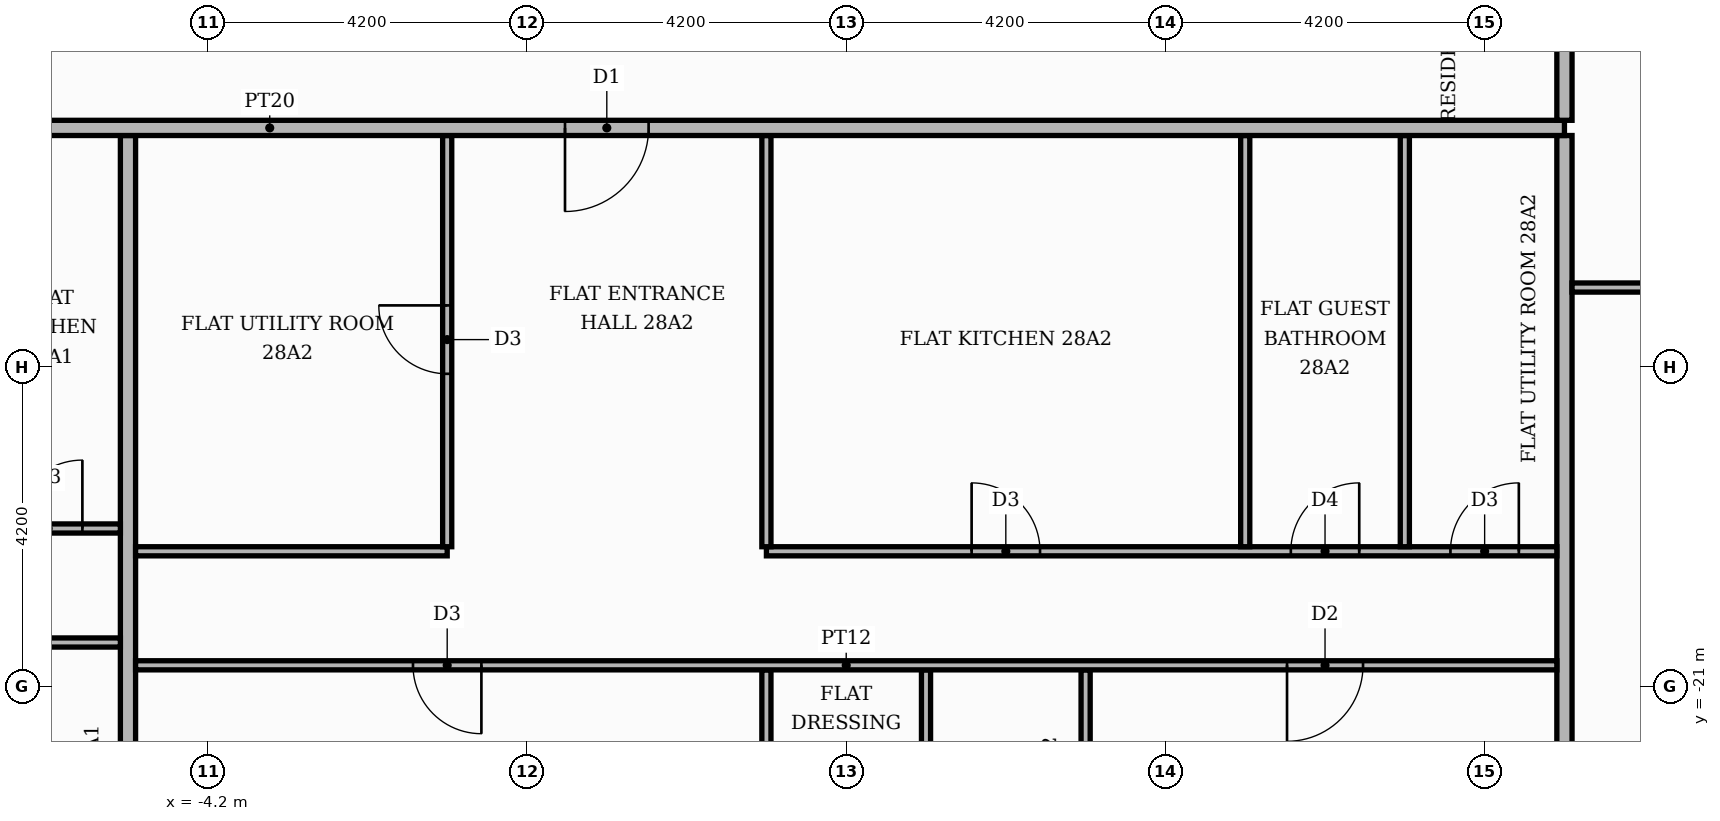
"""IFC4 building model, lengths in metres.
Left out: names, types, materials, properties, quantities, classifications, styles, units other than length and angle.
Written with IfcOpenShell. Run it as: python <this file> out.ifc"""

import sys

from ifc_helpers import new_model, si_unit, direction, frame, frame_2d, origin, place, context, subcontext, project, spatial, rectangle, extrude, element, fill, save


model = new_model("IFC4")
c1 = context("Model", 3, precision=1e-05, world=origin(), true_north=direction((0.0, 1.0)))
c2 = subcontext(c1, "Body", "Model", "MODEL_VIEW")
j1 = project(units=[si_unit("LENGTHUNIT", "METRE"), si_unit("PLANEANGLEUNIT", "RADIAN")], contexts=[c1])
p1 = place(None, origin())
s1 = spatial("IfcSite", under=j1, at=p1, CompositionType="ELEMENT")
p2 = place(p1, origin())
s2 = spatial("IfcBuilding", under=s1, at=p2, CompositionType="ELEMENT")
p3 = place(p2, frame((0.0, 0.0, 118.2)))
s3 = spatial("IfcBuildingStorey", under=s2, at=p3, CompositionType="ELEMENT", Elevation=118.2)
p4 = place(p3, frame((-5.25, -25.42, 0.0), z_axis=(0.0, 0.0, 1.0), x_axis=(0.0, 1.0, 0.0)))
e1 = element("IfcWall", 1, at=p4, inside=s3, PredefinedType="PARTITIONING", context=c2, shape_type="SweptSolid", body=[
    extrude(rectangle(XDim=11.67, YDim=0.2, at=frame_2d((5.835, 0.0))), origin(), (0.0, 0.0, 1.0), 3.48),
])
p5 = place(p3, frame((3.15, -25.42, 0.0), z_axis=(0.0, 0.0, 1.0), x_axis=(0.0, 1.0, 0.0)))
e2 = element("IfcWall", 2, at=p5, inside=s3, PredefinedType="PARTITIONING", context=c2, shape_type="SweptSolid", body=[
    extrude(rectangle(XDim=4.64, YDim=0.12, at=frame_2d((2.32, 0.0))), origin(), (0.0, 0.0, 1.0), 3.48),
])
p6 = place(p5, frame((1.75, 0.0, 0.0)))
e3 = element("IfcOpeningElement", 3, at=p6, cuts=e2, PredefinedType="OPENING", context=c2, shape_type="SweptSolid", body=[
    extrude(rectangle(XDim=0.9, YDim=2.1, at=frame_2d((0.45, 1.05))), frame((0.0, 0.07, 0.0), z_axis=(0.0, -1.0, 0.0), x_axis=(1.0, 0.0, 0.0)), (0.0, 0.0, 1.0), 0.14),
])
p7 = place(p3, frame((5.25, -25.42, 0.0), z_axis=(0.0, 0.0, 1.0), x_axis=(0.0, 1.0, 0.0)))
e4 = element("IfcWall", 4, at=p7, inside=s3, PredefinedType="PARTITIONING", context=c2, shape_type="SweptSolid", body=[
    extrude(rectangle(XDim=4.64, YDim=0.12, at=frame_2d((2.32, 0.0))), origin(), (0.0, 0.0, 1.0), 3.48),
])
p8 = place(p7, frame((1.75, 0.0, 0.0)))
e5 = element("IfcOpeningElement", 5, at=p8, cuts=e4, PredefinedType="OPENING", context=c2, shape_type="SweptSolid", body=[
    extrude(rectangle(XDim=0.9, YDim=2.1, at=frame_2d((0.45, 1.05))), frame((0.0, 0.07, 0.0), z_axis=(0.0, -1.0, 0.0), x_axis=(1.0, 0.0, 0.0)), (0.0, 0.0, 1.0), 0.14),
])
p9 = place(p3, frame((7.35, -25.42, 0.0), z_axis=(0.0, 0.0, 1.0), x_axis=(0.0, 1.0, 0.0)))
e6 = element("IfcWall", 6, at=p9, inside=s3, PredefinedType="PARTITIONING", context=c2, shape_type="SweptSolid", body=[
    extrude(rectangle(XDim=4.64, YDim=0.12, at=frame_2d((2.32, 0.0))), origin(), (0.0, 0.0, 1.0), 3.48),
])
p10 = place(p3, frame((13.65, -25.42, 0.0), z_axis=(0.0, 0.0, 1.0), x_axis=(0.0, 1.0, 0.0)))
e7 = element("IfcWall", 7, at=p10, inside=s3, PredefinedType="PARTITIONING", context=c2, shape_type="SweptSolid", body=[
    extrude(rectangle(XDim=11.67, YDim=0.2, at=frame_2d((5.835, 0.0))), origin(), (0.0, 0.0, 1.0), 3.48),
])
p11 = place(p3, frame((-5.15, -20.72, 0.0), z_axis=(0.0, 0.0, 1.0), x_axis=(1.0, 0.0, 0.0)))
e8 = element("IfcWall", 8, at=p11, inside=s3, PredefinedType="PARTITIONING", context=c2, shape_type="SweptSolid", body=[
    extrude(rectangle(XDim=18.7, YDim=0.12, at=frame_2d((9.35, 0.0))), origin(), (0.0, 0.0, 1.0), 3.48),
])
p12 = place(p11, frame((3.65, 0.0, 0.0)))
e9 = element("IfcOpeningElement", 9, at=p12, cuts=e8, PredefinedType="OPENING", context=c2, shape_type="SweptSolid", body=[
    extrude(rectangle(XDim=0.9, YDim=2.1, at=frame_2d((0.45, 1.05))), frame((0.0, 0.07, 0.0), z_axis=(0.0, -1.0, 0.0), x_axis=(1.0, 0.0, 0.0)), (0.0, 0.0, 1.0), 0.14),
])
p13 = place(p11, frame((15.15, 0.0, 0.0)))
e10 = element("IfcOpeningElement", 10, at=p13, cuts=e8, PredefinedType="OPENING", context=c2, shape_type="SweptSolid", body=[
    extrude(rectangle(XDim=1.0, YDim=2.1, at=frame_2d((0.5, 1.05))), frame((0.0, 0.07, 0.0), z_axis=(0.0, -1.0, 0.0), x_axis=(1.0, 0.0, 0.0)), (0.0, 0.0, 1.0), 0.14),
])
p14 = place(p3, frame((-25.42, -20.42, 0.0), z_axis=(0.0, 0.0, 1.0), x_axis=(1.0, 0.0, 0.0)))
e11 = element("IfcWall", 11, at=p14, inside=s3, PredefinedType="PARTITIONING", context=c2, shape_type="SweptSolid", body=[
    extrude(rectangle(XDim=20.07, YDim=0.12, at=frame_2d((10.035, 0.0))), origin(), (0.0, 0.0, 1.0), 3.48),
])
p15 = place(p14, frame((10.22, 0.0, 0.0)))
e12 = element("IfcOpeningElement", 12, at=p15, cuts=e11, PredefinedType="OPENING", context=c2, shape_type="SweptSolid", body=[
    extrude(rectangle(XDim=1.0, YDim=2.1, at=frame_2d((0.5, 1.05))), frame((0.0, 0.07, 0.0), z_axis=(0.0, -1.0, 0.0), x_axis=(1.0, 0.0, 0.0)), (0.0, 0.0, 1.0), 0.14),
])
p16 = place(p14, frame((13.42, 0.0, 0.0)))
e13 = element("IfcOpeningElement", 13, at=p16, cuts=e11, PredefinedType="OPENING", context=c2, shape_type="SweptSolid", body=[
    extrude(rectangle(XDim=0.9, YDim=2.1, at=frame_2d((0.45, 1.05))), frame((0.0, 0.07, 0.0), z_axis=(0.0, -1.0, 0.0), x_axis=(1.0, 0.0, 0.0)), (0.0, 0.0, 1.0), 0.14),
])
p17 = place(p3, frame((-5.15, -19.22, 0.0), z_axis=(0.0, 0.0, 1.0), x_axis=(1.0, 0.0, 0.0)))
e14 = element("IfcWall", 14, at=p17, inside=s3, PredefinedType="PARTITIONING", context=c2, shape_type="SweptSolid", body=[
    extrude(rectangle(XDim=4.1, YDim=0.12, at=frame_2d((2.05, 0.0))), origin(), (0.0, 0.0, 1.0), 3.48),
])
p18 = place(p3, frame((3.15, -19.22, 0.0), z_axis=(0.0, 0.0, 1.0), x_axis=(1.0, 0.0, 0.0)))
e15 = element("IfcWall", 15, at=p18, inside=s3, PredefinedType="PARTITIONING", context=c2, shape_type="SweptSolid", body=[
    extrude(rectangle(XDim=10.4, YDim=0.12, at=frame_2d((5.2, 0.0))), origin(), (0.0, 0.0, 1.0), 3.48),
])
p19 = place(p18, frame((2.7, 0.0, 0.0)))
e16 = element("IfcOpeningElement", 16, at=p19, cuts=e15, PredefinedType="OPENING", context=c2, shape_type="SweptSolid", body=[
    extrude(rectangle(XDim=0.9, YDim=2.1, at=frame_2d((0.45, 1.05))), frame((0.0, 0.07, 0.0), z_axis=(0.0, -1.0, 0.0), x_axis=(1.0, 0.0, 0.0)), (0.0, 0.0, 1.0), 0.14),
])
p20 = place(p18, frame((6.9, 0.0, 0.0)))
e17 = element("IfcOpeningElement", 17, at=p20, cuts=e15, PredefinedType="OPENING", context=c2, shape_type="SweptSolid", body=[
    extrude(rectangle(XDim=0.9, YDim=2.1, at=frame_2d((0.45, 1.05))), frame((0.0, 0.07, 0.0), z_axis=(0.0, -1.0, 0.0), x_axis=(1.0, 0.0, 0.0)), (0.0, 0.0, 1.0), 0.14),
])
p21 = place(p18, frame((9.0, 0.0, 0.0)))
e18 = element("IfcOpeningElement", 18, at=p21, cuts=e15, PredefinedType="OPENING", context=c2, shape_type="SweptSolid", body=[
    extrude(rectangle(XDim=0.9, YDim=2.1, at=frame_2d((0.45, 1.05))), frame((0.0, 0.07, 0.0), z_axis=(0.0, -1.0, 0.0), x_axis=(1.0, 0.0, 0.0)), (0.0, 0.0, 1.0), 0.14),
])
p22 = place(p3, frame((-1.05, -19.16, 0.0), z_axis=(0.0, 0.0, 1.0), x_axis=(0.0, 1.0, 0.0)))
e19 = element("IfcWall", 19, at=p22, inside=s3, PredefinedType="PARTITIONING", context=c2, shape_type="SweptSolid", body=[
    extrude(rectangle(XDim=5.41, YDim=0.12, at=frame_2d((2.705, 0.0))), origin(), (0.0, 0.0, 1.0), 3.48),
])
p23 = place(p22, frame((2.275, 0.0, 0.0)))
e20 = element("IfcOpeningElement", 20, at=p23, cuts=e19, PredefinedType="OPENING", context=c2, shape_type="SweptSolid", body=[
    extrude(rectangle(XDim=0.9, YDim=2.1, at=frame_2d((0.45, 1.05))), frame((0.0, 0.07, 0.0), z_axis=(0.0, -1.0, 0.0), x_axis=(1.0, 0.0, 0.0)), (0.0, 0.0, 1.0), 0.14),
])
for number, where, z_axis, x_axis in (
    (21, (3.15, -19.16, 0.0), (0.0, 0.0, 1.0), (0.0, 1.0, 0.0)),
    (22, (9.45, -19.16, 0.0), (0.0, 0.0, 1.0), (0.0, 1.0, 0.0)),
    (23, (11.55, -19.16, 0.0), (0.0, 0.0, 1.0), (0.0, 1.0, 0.0)),
):
    element("IfcWall", number, at=place(p3, frame(where, z_axis=z_axis, x_axis=x_axis)), inside=s3, PredefinedType="PARTITIONING", context=c2, shape_type="SweptSolid", body=[
        extrude(rectangle(XDim=5.41, YDim=0.12, at=frame_2d((2.705, 0.0))), origin(), (0.0, 0.0, 1.0), 3.48),
    ])
p24 = place(p3, frame((-9.45, -18.92, 0.0), z_axis=(0.0, 0.0, 1.0), x_axis=(1.0, 0.0, 0.0)))
e24 = element("IfcWall", 24, at=p24, inside=s3, PredefinedType="PARTITIONING", context=c2, shape_type="SweptSolid", body=[
    extrude(rectangle(XDim=4.1, YDim=0.12, at=frame_2d((2.05, 0.0))), origin(), (0.0, 0.0, 1.0), 3.48),
])
p25 = place(p24, frame((2.7, 0.0, 0.0)))
e25 = element("IfcOpeningElement", 25, at=p25, cuts=e24, PredefinedType="OPENING", context=c2, shape_type="SweptSolid", body=[
    extrude(rectangle(XDim=0.9, YDim=2.1, at=frame_2d((0.45, 1.05))), frame((0.0, 0.07, 0.0), z_axis=(0.0, -1.0, 0.0), x_axis=(1.0, 0.0, 0.0)), (0.0, 0.0, 1.0), 0.14),
])
p26 = place(p3, frame((13.75, -15.75, 0.0), z_axis=(0.0, 0.0, 1.0), x_axis=(1.0, 0.0, 0.0)))
e26 = element("IfcWall", 26, at=p26, inside=s3, PredefinedType="PARTITIONING", context=c2, shape_type="SweptSolid", body=[
    extrude(rectangle(XDim=6.07, YDim=0.12, at=frame_2d((3.035, 0.0))), origin(), (0.0, 0.0, 1.0), 3.48),
])
p27 = place(p26, frame((2.485, 0.0, 0.0)))
e27 = element("IfcOpeningElement", 27, at=p27, cuts=e26, PredefinedType="OPENING", context=c2, shape_type="SweptSolid", body=[
    extrude(rectangle(XDim=1.0, YDim=2.1, at=frame_2d((0.5, 1.05))), frame((0.0, 0.07, 0.0), z_axis=(0.0, -1.0, 0.0), x_axis=(1.0, 0.0, 0.0)), (0.0, 0.0, 1.0), 0.14),
])
p28 = place(p3, frame((-20.42, -13.65, 0.0), z_axis=(0.0, 0.0, 1.0), x_axis=(1.0, 0.0, 0.0)))
e28 = element("IfcWall", 28, at=p28, inside=s3, PredefinedType="PARTITIONING", context=c2, shape_type="SweptSolid", body=[
    extrude(rectangle(XDim=34.07, YDim=0.2, at=frame_2d((17.035, 0.0))), origin(), (0.0, 0.0, 1.0), 3.48),
])
p29 = place(p28, frame((8.32, 0.0, 0.0)))
e29 = element("IfcOpeningElement", 29, at=p29, cuts=e28, PredefinedType="OPENING", context=c2, shape_type="SweptSolid", body=[
    extrude(rectangle(XDim=1.1, YDim=2.4, at=frame_2d((0.55, 1.2))), frame((0.0, 0.11, 0.0), z_axis=(0.0, -1.0, 0.0), x_axis=(1.0, 0.0, 0.0)), (0.0, 0.0, 1.0), 0.22),
])
p30 = place(p28, frame((20.92, 0.0, 0.0)))
e30 = element("IfcOpeningElement", 30, at=p30, cuts=e28, PredefinedType="OPENING", context=c2, shape_type="SweptSolid", body=[
    extrude(rectangle(XDim=1.1, YDim=2.4, at=frame_2d((0.55, 1.2))), frame((0.0, 0.11, 0.0), z_axis=(0.0, -1.0, 0.0), x_axis=(1.0, 0.0, 0.0)), (0.0, 0.0, 1.0), 0.22),
])
p31 = place(p3, frame((13.65, -13.55, 0.0), z_axis=(0.0, 0.0, 1.0), x_axis=(0.0, 1.0, 0.0)))
e31 = element("IfcWall", 31, at=p31, inside=s3, PredefinedType="PARTITIONING", context=c2, shape_type="SweptSolid", body=[
    extrude(rectangle(XDim=8.2, YDim=0.2, at=frame_2d((4.1, 0.0))), origin(), (0.0, 0.0, 1.0), 3.48),
])
p32 = place(p31, frame((1.45, 0.0, 0.0)))
e32 = element("IfcOpeningElement", 32, at=p32, cuts=e31, PredefinedType="OPENING", context=c2, shape_type="SweptSolid", body=[
    extrude(rectangle(XDim=1.1, YDim=2.4, at=frame_2d((0.55, 1.2))), frame((0.0, 0.11, 0.0), z_axis=(0.0, -1.0, 0.0), x_axis=(1.0, 0.0, 0.0)), (0.0, 0.0, 1.0), 0.22),
])
p33 = place(p25, origin())
e33 = element("IfcDoor", 33, at=p33, inside=s3, OperationType="SINGLE_SWING_RIGHT", PredefinedType="DOOR", context=c2, shape_type="SweptSolid", body=[
    extrude(rectangle(XDim=0.9, YDim=2.1, at=frame_2d((0.45, 1.05))), frame((0.0, 0.025, 0.0), z_axis=(0.0, -1.0, 0.0), x_axis=(1.0, 0.0, 0.0)), (0.0, 0.0, 1.0), 0.05),
])
fill(e25, e33)
p34 = place(p30, frame((1.1, 0.0, 0.0), z_axis=(0.0, 0.0, 1.0), x_axis=(-1.0, 0.0, 0.0)))
e34 = element("IfcDoor", 34, at=p34, inside=s3, OperationType="SINGLE_SWING_LEFT", PredefinedType="DOOR", context=c2, shape_type="SweptSolid", body=[
    extrude(rectangle(XDim=1.1, YDim=2.4, at=frame_2d((0.55, 1.2))), frame((0.0, 0.025, 0.0), z_axis=(0.0, -1.0, 0.0), x_axis=(1.0, 0.0, 0.0)), (0.0, 0.0, 1.0), 0.05),
])
fill(e30, e34)
p35 = place(p23, origin())
e35 = element("IfcDoor", 35, at=p35, inside=s3, OperationType="SINGLE_SWING_RIGHT", PredefinedType="DOOR", context=c2, shape_type="SweptSolid", body=[
    extrude(rectangle(XDim=0.9, YDim=2.1, at=frame_2d((0.45, 1.05))), frame((0.0, 0.025, 0.0), z_axis=(0.0, -1.0, 0.0), x_axis=(1.0, 0.0, 0.0)), (0.0, 0.0, 1.0), 0.05),
])
fill(e20, e35)
p36 = place(p19, origin())
e36 = element("IfcDoor", 36, at=p36, inside=s3, OperationType="SINGLE_SWING_LEFT", PredefinedType="DOOR", context=c2, shape_type="SweptSolid", body=[
    extrude(rectangle(XDim=0.9, YDim=2.1, at=frame_2d((0.45, 1.05))), frame((0.0, 0.025, 0.0), z_axis=(0.0, -1.0, 0.0), x_axis=(1.0, 0.0, 0.0)), (0.0, 0.0, 1.0), 0.05),
])
fill(e16, e36)
p37 = place(p20, origin())
e37 = element("IfcDoor", 37, at=p37, inside=s3, OperationType="SINGLE_SWING_RIGHT", PredefinedType="DOOR", context=c2, shape_type="SweptSolid", body=[
    extrude(rectangle(XDim=0.9, YDim=2.1, at=frame_2d((0.45, 1.05))), frame((0.0, 0.025, 0.0), z_axis=(0.0, -1.0, 0.0), x_axis=(1.0, 0.0, 0.0)), (0.0, 0.0, 1.0), 0.05),
])
fill(e17, e37)
p38 = place(p21, origin())
e38 = element("IfcDoor", 38, at=p38, inside=s3, OperationType="SINGLE_SWING_RIGHT", PredefinedType="DOOR", context=c2, shape_type="SweptSolid", body=[
    extrude(rectangle(XDim=0.9, YDim=2.1, at=frame_2d((0.45, 1.05))), frame((0.0, 0.025, 0.0), z_axis=(0.0, -1.0, 0.0), x_axis=(1.0, 0.0, 0.0)), (0.0, 0.0, 1.0), 0.05),
])
fill(e18, e38)
p39 = place(p12, frame((0.9, 0.0, 0.0), z_axis=(0.0, 0.0, 1.0), x_axis=(-1.0, 0.0, 0.0)))
e39 = element("IfcDoor", 39, at=p39, inside=s3, OperationType="SINGLE_SWING_RIGHT", PredefinedType="DOOR", context=c2, shape_type="SweptSolid", body=[
    extrude(rectangle(XDim=0.9, YDim=2.1, at=frame_2d((0.45, 1.05))), frame((0.0, 0.025, 0.0), z_axis=(0.0, -1.0, 0.0), x_axis=(1.0, 0.0, 0.0)), (0.0, 0.0, 1.0), 0.05),
])
fill(e9, e39)
p40 = place(p13, frame((1.0, 0.0, 0.0), z_axis=(0.0, 0.0, 1.0), x_axis=(-1.0, 0.0, 0.0)))
e40 = element("IfcDoor", 40, at=p40, inside=s3, OperationType="SINGLE_SWING_LEFT", PredefinedType="DOOR", context=c2, shape_type="SweptSolid", body=[
    extrude(rectangle(XDim=1.0, YDim=2.1, at=frame_2d((0.5, 1.05))), frame((0.0, 0.025, 0.0), z_axis=(0.0, -1.0, 0.0), x_axis=(1.0, 0.0, 0.0)), (0.0, 0.0, 1.0), 0.05),
])
fill(e10, e40)
save(model, sys.argv[1])
